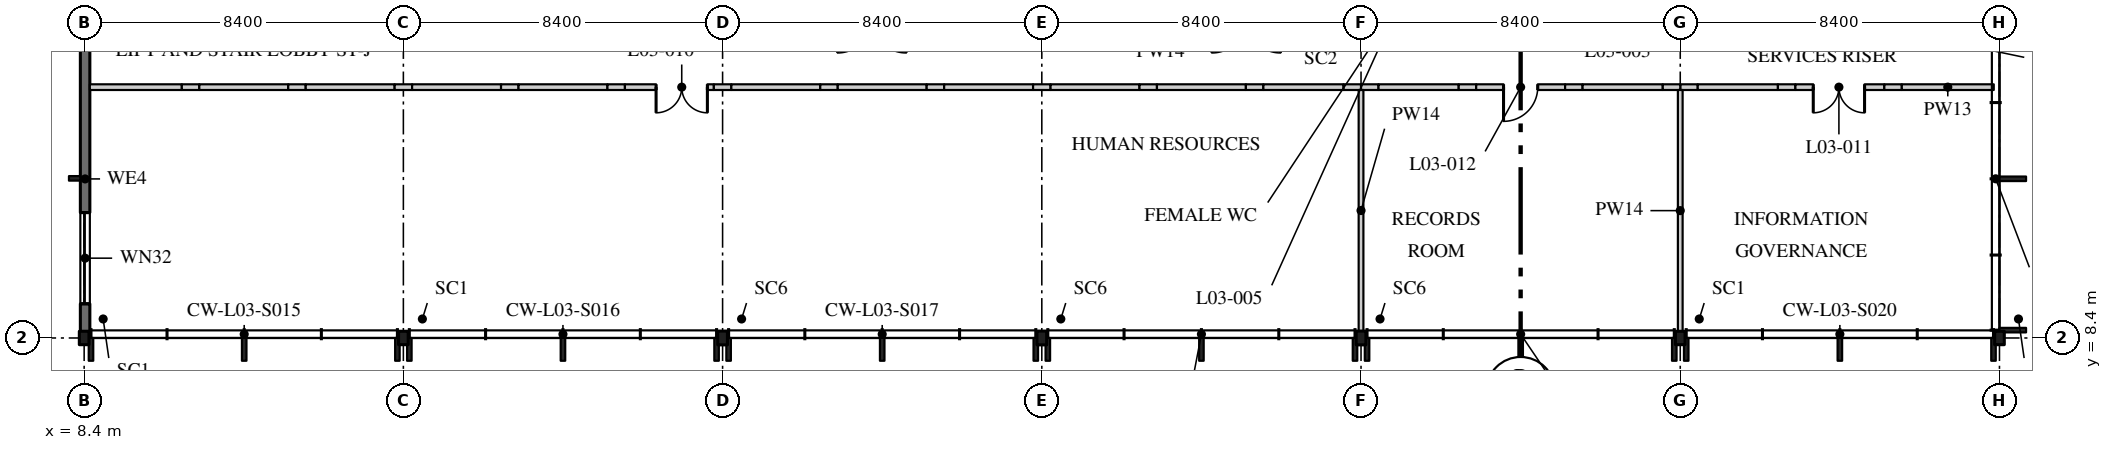
"""IFC4 building model, lengths in metres.
Left out: names, types, materials, properties, quantities, classifications, styles, units other than length and angle.
Written with IfcOpenShell. Run it as: python <this file> out.ifc"""

import sys

from ifc_helpers import new_model, si_unit, direction, frame, frame_2d, origin, origin_2d, place, context, subcontext, project, spatial, rectangle, i_section, extrude, element, fill, save


model = new_model("IFC4")
c1 = context("Model", 3, precision=1e-05, world=origin(), true_north=direction((0.0, 1.0)))
c2 = subcontext(c1, "Body", "Model", "MODEL_VIEW")
j1 = project(units=[si_unit("LENGTHUNIT", "METRE"), si_unit("PLANEANGLEUNIT", "RADIAN")], contexts=[c1])
p1 = place(None, origin())
s1 = spatial("IfcSite", under=j1, at=p1, CompositionType="ELEMENT")
p2 = place(p1, origin())
s2 = spatial("IfcBuilding", under=s1, at=p2, CompositionType="ELEMENT")
p3 = place(p2, frame((0.0, 0.0, 14.4)))
s3 = spatial("IfcBuildingStorey", under=s2, at=p3, CompositionType="ELEMENT", Elevation=14.4)
for number, where, z_axis, x_axis in (
    (1, (8.4, 8.4, 0.0), (0.0, 0.0, 1.0), (1.0, 0.0, 0.0)),
    (2, (16.8, 8.4, 0.0), (0.0, 0.0, 1.0), (1.0, 0.0, 0.0)),
):
    element("IfcColumn", number, at=place(p3, frame(where, z_axis=z_axis, x_axis=x_axis)), inside=s3, PredefinedType="COLUMN", context=c2, shape_type="SweptSolid", body=[
        extrude(i_section(OverallWidth=0.254, OverallDepth=0.353, WebThickness=0.01, FlangeThickness=0.016, FilletRadius=0.015, at=origin_2d()), origin(), (0.0, 0.0, 1.0), 4.37),
    ])
for number, where, z_axis, x_axis in (
    (3, (25.2, 8.4, 0.0), (0.0, 0.0, 1.0), (1.0, 0.0, 0.0)),
    (4, (33.6, 8.4, 0.0), (0.0, 0.0, 1.0), (1.0, 0.0, 0.0)),
    (5, (42.0, 8.4, 0.0), (0.0, 0.0, 1.0), (1.0, 0.0, 0.0)),
):
    element("IfcColumn", number, at=place(p3, frame(where, z_axis=z_axis, x_axis=x_axis)), inside=s3, PredefinedType="COLUMN", context=c2, shape_type="SweptSolid", body=[
        extrude(i_section(OverallWidth=0.257, OverallDepth=0.363, WebThickness=0.013, FlangeThickness=0.022, FilletRadius=0.015, at=origin_2d()), origin(), (0.0, 0.0, 1.0), 4.37),
    ])
for number, where, z_axis, x_axis in (
    (6, (50.4, 8.4, 0.0), (0.0, 0.0, 1.0), (1.0, 0.0, 0.0)),
    (7, (58.8, 8.4, 0.0), (0.0, 0.0, 1.0), (1.0, 0.0, 0.0)),
):
    element("IfcColumn", number, at=place(p3, frame(where, z_axis=z_axis, x_axis=x_axis)), inside=s3, PredefinedType="COLUMN", context=c2, shape_type="SweptSolid", body=[
        extrude(i_section(OverallWidth=0.254, OverallDepth=0.353, WebThickness=0.01, FlangeThickness=0.016, FilletRadius=0.015, at=origin_2d()), origin(), (0.0, 0.0, 1.0), 4.37),
    ])
p4 = place(p3, frame((8.55, 15.0, 0.0), z_axis=(0.0, 0.0, 1.0), x_axis=(1.0, 0.0, 0.0)))
e8 = element("IfcWall", 8, at=p4, inside=s3, PredefinedType="PARTITIONING", context=c2, shape_type="SweptSolid", body=[
    extrude(rectangle(XDim=2.42, YDim=0.15, at=frame_2d((1.21, 0.0))), origin(), (0.0, 0.0, 1.0), 4.37),
])
p5 = place(p3, frame((10.97, 15.0, 0.0), z_axis=(0.0, 0.0, 1.0), x_axis=(1.0, 0.0, 0.0)))
e9 = element("IfcWall", 9, at=p5, inside=s3, PredefinedType="PARTITIONING", context=c2, shape_type="SweptSolid", body=[
    extrude(rectangle(XDim=0.46, YDim=0.15, at=frame_2d((0.23, 0.0))), origin(), (0.0, 0.0, 1.0), 3.941),
])
p6 = place(p3, frame((11.43, 15.0, 0.0), z_axis=(0.0, 0.0, 1.0), x_axis=(1.0, 0.0, 0.0)))
e10 = element("IfcWall", 10, at=p6, inside=s3, PredefinedType="PARTITIONING", context=c2, shape_type="SweptSolid", body=[
    extrude(rectangle(XDim=2.34, YDim=0.15, at=frame_2d((1.17, 0.0))), origin(), (0.0, 0.0, 1.0), 4.37),
])
p7 = place(p3, frame((13.77, 15.0, 0.0), z_axis=(0.0, 0.0, 1.0), x_axis=(1.0, 0.0, 0.0)))
e11 = element("IfcWall", 11, at=p7, inside=s3, PredefinedType="PARTITIONING", context=c2, shape_type="SweptSolid", body=[
    extrude(rectangle(XDim=0.46, YDim=0.15, at=frame_2d((0.23, 0.0))), origin(), (0.0, 0.0, 1.0), 3.941),
])
p8 = place(p3, frame((14.23, 15.0, 0.0), z_axis=(0.0, 0.0, 1.0), x_axis=(1.0, 0.0, 0.0)))
e12 = element("IfcWall", 12, at=p8, inside=s3, PredefinedType="PARTITIONING", context=c2, shape_type="SweptSolid", body=[
    extrude(rectangle(XDim=2.34, YDim=0.15, at=frame_2d((1.17, 0.0))), origin(), (0.0, 0.0, 1.0), 4.37),
])
p9 = place(p3, frame((16.57, 15.0, 0.0), z_axis=(0.0, 0.0, 1.0), x_axis=(1.0, 0.0, 0.0)))
e13 = element("IfcWall", 13, at=p9, inside=s3, PredefinedType="PARTITIONING", context=c2, shape_type="SweptSolid", body=[
    extrude(rectangle(XDim=0.46, YDim=0.15, at=frame_2d((0.23, 0.0))), origin(), (0.0, 0.0, 1.0), 3.743),
])
p10 = place(p3, frame((17.03, 15.0, 0.0), z_axis=(0.0, 0.0, 1.0), x_axis=(1.0, 0.0, 0.0)))
e14 = element("IfcWall", 14, at=p10, inside=s3, PredefinedType="PARTITIONING", context=c2, shape_type="SweptSolid", body=[
    extrude(rectangle(XDim=2.34, YDim=0.15, at=frame_2d((1.17, 0.0))), origin(), (0.0, 0.0, 1.0), 4.37),
])
p11 = place(p3, frame((19.37, 15.0, 0.0), z_axis=(0.0, 0.0, 1.0), x_axis=(1.0, 0.0, 0.0)))
e15 = element("IfcWall", 15, at=p11, inside=s3, PredefinedType="PARTITIONING", context=c2, shape_type="SweptSolid", body=[
    extrude(rectangle(XDim=0.46, YDim=0.15, at=frame_2d((0.23, 0.0))), origin(), (0.0, 0.0, 1.0), 3.941),
])
p12 = place(p3, frame((19.83, 15.0, 0.0), z_axis=(0.0, 0.0, 1.0), x_axis=(1.0, 0.0, 0.0)))
e16 = element("IfcWall", 16, at=p12, inside=s3, PredefinedType="PARTITIONING", context=c2, shape_type="SweptSolid", body=[
    extrude(rectangle(XDim=2.34, YDim=0.15, at=frame_2d((1.17, 0.0))), origin(), (0.0, 0.0, 1.0), 4.37),
])
p13 = place(p3, frame((22.17, 15.0, 0.0), z_axis=(0.0, 0.0, 1.0), x_axis=(1.0, 0.0, 0.0)))
e17 = element("IfcWall", 17, at=p13, inside=s3, PredefinedType="PARTITIONING", context=c2, shape_type="SweptSolid", body=[
    extrude(rectangle(XDim=0.46, YDim=0.15, at=frame_2d((0.23, 0.0))), origin(), (0.0, 0.0, 1.0), 3.941),
])
p14 = place(p3, frame((22.63, 15.0, 0.0), z_axis=(0.0, 0.0, 1.0), x_axis=(1.0, 0.0, 0.0)))
e18 = element("IfcWall", 18, at=p14, inside=s3, PredefinedType="PARTITIONING", context=c2, shape_type="SweptSolid", body=[
    extrude(rectangle(XDim=2.34, YDim=0.15, at=frame_2d((1.17, 0.0))), origin(), (0.0, 0.0, 1.0), 4.37),
])
p15 = place(p14, frame((0.82, 0.0, 0.0)))
e19 = element("IfcOpeningElement", 19, at=p15, cuts=e18, PredefinedType="OPENING", context=c2, shape_type="SweptSolid", body=[
    extrude(rectangle(XDim=1.35, YDim=2.1, at=frame_2d((0.675, 1.05))), frame((0.0, 0.085, 0.0), z_axis=(0.0, -1.0, 0.0), x_axis=(1.0, 0.0, 0.0)), (0.0, 0.0, 1.0), 0.17),
])
p16 = place(p3, frame((24.97, 15.0, 0.0), z_axis=(0.0, 0.0, 1.0), x_axis=(1.0, 0.0, 0.0)))
e20 = element("IfcWall", 20, at=p16, inside=s3, PredefinedType="PARTITIONING", context=c2, shape_type="SweptSolid", body=[
    extrude(rectangle(XDim=0.46, YDim=0.15, at=frame_2d((0.23, 0.0))), origin(), (0.0, 0.0, 1.0), 3.743),
])
p17 = place(p3, frame((25.43, 15.0, 0.0), z_axis=(0.0, 0.0, 1.0), x_axis=(1.0, 0.0, 0.0)))
e21 = element("IfcWall", 21, at=p17, inside=s3, PredefinedType="PARTITIONING", context=c2, shape_type="SweptSolid", body=[
    extrude(rectangle(XDim=2.34, YDim=0.15, at=frame_2d((1.17, 0.0))), origin(), (0.0, 0.0, 1.0), 4.37),
])
p18 = place(p3, frame((27.77, 15.0, 0.0), z_axis=(0.0, 0.0, 1.0), x_axis=(1.0, 0.0, 0.0)))
e22 = element("IfcWall", 22, at=p18, inside=s3, PredefinedType="PARTITIONING", context=c2, shape_type="SweptSolid", body=[
    extrude(rectangle(XDim=0.46, YDim=0.15, at=frame_2d((0.23, 0.0))), origin(), (0.0, 0.0, 1.0), 3.941),
])
p19 = place(p3, frame((28.23, 15.0, 0.0), z_axis=(0.0, 0.0, 1.0), x_axis=(1.0, 0.0, 0.0)))
e23 = element("IfcWall", 23, at=p19, inside=s3, PredefinedType="PARTITIONING", context=c2, shape_type="SweptSolid", body=[
    extrude(rectangle(XDim=2.34, YDim=0.15, at=frame_2d((1.17, 0.0))), origin(), (0.0, 0.0, 1.0), 4.37),
])
p20 = place(p3, frame((30.57, 15.0, 0.0), z_axis=(0.0, 0.0, 1.0), x_axis=(1.0, 0.0, 0.0)))
e24 = element("IfcWall", 24, at=p20, inside=s3, PredefinedType="PARTITIONING", context=c2, shape_type="SweptSolid", body=[
    extrude(rectangle(XDim=0.46, YDim=0.15, at=frame_2d((0.23, 0.0))), origin(), (0.0, 0.0, 1.0), 3.941),
])
p21 = place(p3, frame((31.03, 15.0, 0.0), z_axis=(0.0, 0.0, 1.0), x_axis=(1.0, 0.0, 0.0)))
e25 = element("IfcWall", 25, at=p21, inside=s3, PredefinedType="PARTITIONING", context=c2, shape_type="SweptSolid", body=[
    extrude(rectangle(XDim=2.34, YDim=0.15, at=frame_2d((1.17, 0.0))), origin(), (0.0, 0.0, 1.0), 4.37),
])
p22 = place(p3, frame((33.37, 15.0, 0.0), z_axis=(0.0, 0.0, 1.0), x_axis=(1.0, 0.0, 0.0)))
e26 = element("IfcWall", 26, at=p22, inside=s3, PredefinedType="PARTITIONING", context=c2, shape_type="SweptSolid", body=[
    extrude(rectangle(XDim=0.46, YDim=0.15, at=frame_2d((0.23, 0.0))), origin(), (0.0, 0.0, 1.0), 3.743),
])
p23 = place(p3, frame((33.83, 15.0, 0.0), z_axis=(0.0, 0.0, 1.0), x_axis=(1.0, 0.0, 0.0)))
e27 = element("IfcWall", 27, at=p23, inside=s3, PredefinedType="PARTITIONING", context=c2, shape_type="SweptSolid", body=[
    extrude(rectangle(XDim=2.34, YDim=0.15, at=frame_2d((1.17, 0.0))), origin(), (0.0, 0.0, 1.0), 4.37),
])
p24 = place(p3, frame((36.17, 15.0, 0.0), z_axis=(0.0, 0.0, 1.0), x_axis=(1.0, 0.0, 0.0)))
e28 = element("IfcWall", 28, at=p24, inside=s3, PredefinedType="PARTITIONING", context=c2, shape_type="SweptSolid", body=[
    extrude(rectangle(XDim=0.46, YDim=0.15, at=frame_2d((0.23, 0.0))), origin(), (0.0, 0.0, 1.0), 3.941),
])
p25 = place(p3, frame((36.63, 15.0, 0.0), z_axis=(0.0, 0.0, 1.0), x_axis=(1.0, 0.0, 0.0)))
e29 = element("IfcWall", 29, at=p25, inside=s3, PredefinedType="PARTITIONING", context=c2, shape_type="SweptSolid", body=[
    extrude(rectangle(XDim=2.34, YDim=0.15, at=frame_2d((1.17, 0.0))), origin(), (0.0, 0.0, 1.0), 4.37),
])
p26 = place(p3, frame((38.97, 15.0, 0.0), z_axis=(0.0, 0.0, 1.0), x_axis=(1.0, 0.0, 0.0)))
e30 = element("IfcWall", 30, at=p26, inside=s3, PredefinedType="PARTITIONING", context=c2, shape_type="SweptSolid", body=[
    extrude(rectangle(XDim=0.46, YDim=0.15, at=frame_2d((0.23, 0.0))), origin(), (0.0, 0.0, 1.0), 3.941),
])
p27 = place(p3, frame((39.43, 15.0, 0.0), z_axis=(0.0, 0.0, 1.0), x_axis=(1.0, 0.0, 0.0)))
e31 = element("IfcWall", 31, at=p27, inside=s3, PredefinedType="PARTITIONING", context=c2, shape_type="SweptSolid", body=[
    extrude(rectangle(XDim=2.11, YDim=0.15, at=frame_2d((1.055, 0.0))), origin(), (0.0, 0.0, 1.0), 4.37),
])
p28 = place(p3, frame((41.54, 15.0, 0.0), z_axis=(0.0, 0.0, 1.0), x_axis=(1.0, 0.0, 0.0)))
e32 = element("IfcWall", 32, at=p28, inside=s3, PredefinedType="PARTITIONING", context=c2, shape_type="SweptSolid", body=[
    extrude(rectangle(XDim=0.46, YDim=0.15, at=frame_2d((0.23, 0.0))), origin(), (0.0, 0.0, 1.0), 3.743),
])
p29 = place(p3, frame((50.4, 15.0, 0.0), z_axis=(0.0, 0.0, 1.0), x_axis=(1.0, 0.0, 0.0)))
e33 = element("IfcWall", 33, at=p29, inside=s3, PredefinedType="PARTITIONING", context=c2, shape_type="SweptSolid", body=[
    extrude(rectangle(XDim=0.46, YDim=0.15, at=frame_2d((0.23, 0.0))), origin(), (0.0, 0.0, 1.0), 3.743),
])
p30 = place(p3, frame((50.86, 15.0, 0.0), z_axis=(0.0, 0.0, 1.0), x_axis=(1.0, 0.0, 0.0)))
e34 = element("IfcWall", 34, at=p30, inside=s3, PredefinedType="PARTITIONING", context=c2, shape_type="SweptSolid", body=[
    extrude(rectangle(XDim=2.11, YDim=0.15, at=frame_2d((1.055, 0.0))), origin(), (0.0, 0.0, 1.0), 4.37),
])
p31 = place(p3, frame((52.97, 15.0, 0.0), z_axis=(0.0, 0.0, 1.0), x_axis=(1.0, 0.0, 0.0)))
e35 = element("IfcWall", 35, at=p31, inside=s3, PredefinedType="PARTITIONING", context=c2, shape_type="SweptSolid", body=[
    extrude(rectangle(XDim=0.46, YDim=0.15, at=frame_2d((0.23, 0.0))), origin(), (0.0, 0.0, 1.0), 3.941),
])
p32 = place(p3, frame((53.43, 15.0, 0.0), z_axis=(0.0, 0.0, 1.0), x_axis=(1.0, 0.0, 0.0)))
e36 = element("IfcWall", 36, at=p32, inside=s3, PredefinedType="PARTITIONING", context=c2, shape_type="SweptSolid", body=[
    extrude(rectangle(XDim=2.34, YDim=0.15, at=frame_2d((1.17, 0.0))), origin(), (0.0, 0.0, 1.0), 4.37),
])
p33 = place(p32, frame((0.47, 0.0, 0.0)))
e37 = element("IfcOpeningElement", 37, at=p33, cuts=e36, PredefinedType="OPENING", context=c2, shape_type="SweptSolid", body=[
    extrude(rectangle(XDim=1.35, YDim=2.1, at=frame_2d((0.675, 1.05))), frame((0.0, 0.085, 0.0), z_axis=(0.0, -1.0, 0.0), x_axis=(1.0, 0.0, 0.0)), (0.0, 0.0, 1.0), 0.17),
])
p34 = place(p3, frame((55.77, 15.0, 0.0), z_axis=(0.0, 0.0, 1.0), x_axis=(1.0, 0.0, 0.0)))
e38 = element("IfcWall", 38, at=p34, inside=s3, PredefinedType="PARTITIONING", context=c2, shape_type="SweptSolid", body=[
    extrude(rectangle(XDim=0.46, YDim=0.15, at=frame_2d((0.23, 0.0))), origin(), (0.0, 0.0, 1.0), 3.941),
])
p35 = place(p3, frame((56.23, 15.0, 0.0), z_axis=(0.0, 0.0, 1.0), x_axis=(1.0, 0.0, 0.0)))
e39 = element("IfcWall", 39, at=p35, inside=s3, PredefinedType="PARTITIONING", context=c2, shape_type="SweptSolid", body=[
    extrude(rectangle(XDim=2.42, YDim=0.15, at=frame_2d((1.21, 0.0))), origin(), (0.0, 0.0, 1.0), 4.37),
])
p36 = place(p3, frame((42.0, 15.0, 0.0), z_axis=(0.0, 0.0, 1.0), x_axis=(1.0, 0.0, 0.0)))
e40 = element("IfcWall", 40, at=p36, inside=s3, PredefinedType="PARTITIONING", context=c2, shape_type="SweptSolid", body=[
    extrude(rectangle(XDim=0.46, YDim=0.15, at=frame_2d((0.23, 0.0))), origin(), (0.0, 0.0, 1.0), 3.743),
])
p37 = place(p3, frame((42.46, 15.0, 0.0), z_axis=(0.0, 0.0, 1.0), x_axis=(1.0, 0.0, 0.0)))
e41 = element("IfcWall", 41, at=p37, inside=s3, PredefinedType="PARTITIONING", context=c2, shape_type="SweptSolid", body=[
    extrude(rectangle(XDim=2.11, YDim=0.15, at=frame_2d((1.055, 0.0))), origin(), (0.0, 0.0, 1.0), 4.37),
])
p38 = place(p3, frame((44.57, 15.0, 0.0), z_axis=(0.0, 0.0, 1.0), x_axis=(1.0, 0.0, 0.0)))
e42 = element("IfcWall", 42, at=p38, inside=s3, PredefinedType="PARTITIONING", context=c2, shape_type="SweptSolid", body=[
    extrude(rectangle(XDim=0.46, YDim=0.15, at=frame_2d((0.23, 0.0))), origin(), (0.0, 0.0, 1.0), 3.941),
])
p39 = place(p3, frame((45.03, 15.0, 0.0), z_axis=(0.0, 0.0, 1.0), x_axis=(1.0, 0.0, 0.0)))
e43 = element("IfcWall", 43, at=p39, inside=s3, PredefinedType="PARTITIONING", context=c2, shape_type="SweptSolid", body=[
    extrude(rectangle(XDim=2.34, YDim=0.15, at=frame_2d((1.17, 0.0))), origin(), (0.0, 0.0, 1.0), 4.37),
])
p40 = place(p39, frame((0.72, 0.0, 0.0)))
e44 = element("IfcOpeningElement", 44, at=p40, cuts=e43, PredefinedType="OPENING", context=c2, shape_type="SweptSolid", body=[
    extrude(rectangle(XDim=0.9, YDim=2.1, at=frame_2d((0.45, 1.05))), frame((0.0, 0.085, 0.0), z_axis=(0.0, -1.0, 0.0), x_axis=(1.0, 0.0, 0.0)), (0.0, 0.0, 1.0), 0.17),
])
p41 = place(p3, frame((47.37, 15.0, 0.0), z_axis=(0.0, 0.0, 1.0), x_axis=(1.0, 0.0, 0.0)))
e45 = element("IfcWall", 45, at=p41, inside=s3, PredefinedType="PARTITIONING", context=c2, shape_type="SweptSolid", body=[
    extrude(rectangle(XDim=0.46, YDim=0.15, at=frame_2d((0.23, 0.0))), origin(), (0.0, 0.0, 1.0), 3.941),
])
p42 = place(p3, frame((47.83, 15.0, 0.0), z_axis=(0.0, 0.0, 1.0), x_axis=(1.0, 0.0, 0.0)))
e46 = element("IfcWall", 46, at=p42, inside=s3, PredefinedType="PARTITIONING", context=c2, shape_type="SweptSolid", body=[
    extrude(rectangle(XDim=2.11, YDim=0.15, at=frame_2d((1.055, 0.0))), origin(), (0.0, 0.0, 1.0), 4.37),
])
p43 = place(p3, frame((49.94, 15.0, 0.0), z_axis=(0.0, 0.0, 1.0), x_axis=(1.0, 0.0, 0.0)))
e47 = element("IfcWall", 47, at=p43, inside=s3, PredefinedType="PARTITIONING", context=c2, shape_type="SweptSolid", body=[
    extrude(rectangle(XDim=0.46, YDim=0.15, at=frame_2d((0.23, 0.0))), origin(), (0.0, 0.0, 1.0), 3.743),
])
p44 = place(p3, frame((42.0, 8.582, 0.0), z_axis=(0.0, 0.0, 1.0), x_axis=(0.0, 1.0, 0.0)))
e48 = element("IfcWall", 48, at=p44, inside=s3, PredefinedType="PARTITIONING", context=c2, shape_type="SweptSolid", body=[
    extrude(rectangle(XDim=6.343, YDim=0.125, at=frame_2d((3.171, 0.0))), origin(), (0.0, 0.0, 1.0), 3.743),
])
p45 = place(p3, frame((50.4, 8.577, 0.0), z_axis=(0.0, 0.0, 1.0), x_axis=(0.0, 1.0, 0.0)))
e49 = element("IfcWall", 49, at=p45, inside=s3, PredefinedType="PARTITIONING", context=c2, shape_type="SweptSolid", body=[
    extrude(rectangle(XDim=6.348, YDim=0.125, at=frame_2d((3.174, 0.0))), origin(), (0.0, 0.0, 1.0), 3.743),
])
p46 = place(p3, frame((8.425, 16.6, 0.0), z_axis=(0.0, 0.0, 1.0), x_axis=(0.0, -1.0, 0.0)))
e50 = element("IfcWall", 50, at=p46, inside=s3, PredefinedType="SOLIDWALL", context=c2, shape_type="SweptSolid", body=[
    extrude(rectangle(XDim=8.03, YDim=0.25, at=frame_2d((4.015, 0.0))), origin(), (0.0, 0.0, 1.0), 3.819),
])
p47 = place(p46, frame((4.9, 0.0, 0.6)))
e51 = element("IfcOpeningElement", 51, at=p47, cuts=e50, PredefinedType="OPENING", context=c2, shape_type="SweptSolid", body=[
    extrude(rectangle(XDim=2.4, YDim=2.55, at=frame_2d((1.2, 1.275))), frame((0.0, 0.135, 0.0), z_axis=(0.0, -1.0, 0.0), x_axis=(1.0, 0.0, 0.0)), (0.0, 0.0, 1.0), 0.27),
])
p48 = place(p15, frame((1.35, 0.0, 0.0), z_axis=(0.0, 0.0, 1.0), x_axis=(-1.0, 0.0, 0.0)))
e52 = element("IfcDoor", 52, at=p48, inside=s3, OperationType="DOUBLE_DOOR_SINGLE_SWING", PredefinedType="DOOR", context=c2, shape_type="SweptSolid", body=[
    extrude(rectangle(XDim=1.35, YDim=2.1, at=frame_2d((0.675, 1.05))), frame((0.0, 0.025, 0.0), z_axis=(0.0, -1.0, 0.0), x_axis=(1.0, 0.0, 0.0)), (0.0, 0.0, 1.0), 0.05),
])
fill(e19, e52)
p49 = place(p33, frame((1.35, 0.0, 0.0), z_axis=(0.0, 0.0, 1.0), x_axis=(-1.0, 0.0, 0.0)))
e53 = element("IfcDoor", 53, at=p49, inside=s3, OperationType="DOUBLE_DOOR_SINGLE_SWING", PredefinedType="DOOR", context=c2, shape_type="SweptSolid", body=[
    extrude(rectangle(XDim=1.35, YDim=2.1, at=frame_2d((0.675, 1.05))), frame((0.0, 0.025, 0.0), z_axis=(0.0, -1.0, 0.0), x_axis=(1.0, 0.0, 0.0)), (0.0, 0.0, 1.0), 0.05),
])
fill(e37, e53)
p50 = place(p40, frame((0.9, 0.0, 0.0), z_axis=(0.0, 0.0, 1.0), x_axis=(-1.0, 0.0, 0.0)))
e54 = element("IfcDoor", 54, at=p50, inside=s3, OperationType="SINGLE_SWING_LEFT", PredefinedType="DOOR", context=c2, shape_type="SweptSolid", body=[
    extrude(rectangle(XDim=0.9, YDim=2.1, at=frame_2d((0.45, 1.05))), frame((0.0, 0.025, 0.0), z_axis=(0.0, -1.0, 0.0), x_axis=(1.0, 0.0, 0.0)), (0.0, 0.0, 1.0), 0.05),
])
fill(e44, e54)
p51 = place(p47, origin())
e55 = element("IfcWindow", 55, at=p51, inside=s3, PartitioningType="SINGLE_PANEL", PredefinedType="WINDOW", context=c2, shape_type="SweptSolid", body=[
    extrude(rectangle(XDim=2.4, YDim=2.55, at=frame_2d((1.2, 1.275))), frame((0.0, 0.04, 0.0), z_axis=(0.0, -1.0, 0.0), x_axis=(1.0, 0.0, 0.0)), (0.0, 0.0, 1.0), 0.08),
])
fill(e51, e55)
save(model, sys.argv[1])
